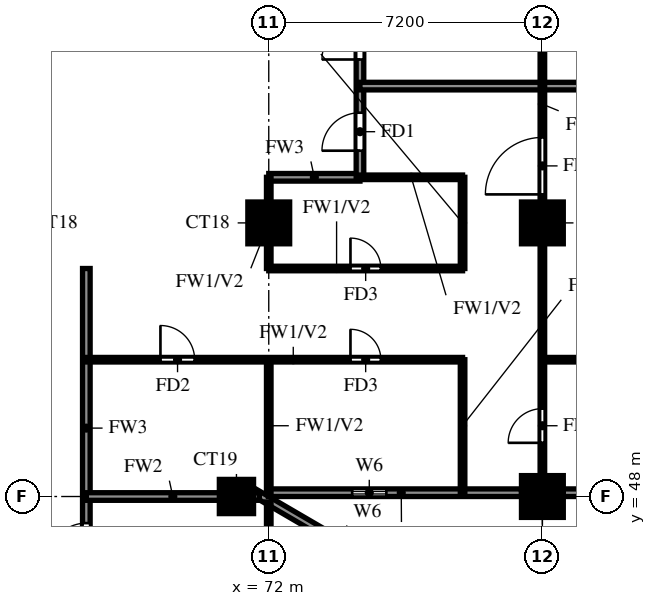
"""IFC4 building model, lengths in metres.
Left out: names, types, materials, properties, quantities, classifications, styles, units other than length and angle.
Written with IfcOpenShell. Run it as: python <this file> out.ifc"""

import sys

from ifc_helpers import new_model, si_unit, direction, frame, frame_2d, origin, origin_2d, place, context, subcontext, project, spatial, rectangle, extrude, source, transform, mapped, element, fill, save


model = new_model("IFC4")
c1 = context("Model", 3, precision=1e-05, world=origin(), true_north=direction((0.0, 1.0)))
c2 = subcontext(c1, "Body", "Model", "MODEL_VIEW")
j1 = project(units=[si_unit("LENGTHUNIT", "METRE"), si_unit("PLANEANGLEUNIT", "RADIAN")], contexts=[c1])
p1 = place(None, origin())
s1 = spatial("IfcSite", under=j1, at=p1, CompositionType="ELEMENT")
p2 = place(p1, origin())
s2 = spatial("IfcBuilding", under=s1, at=p2, CompositionType="ELEMENT")
p3 = place(p2, frame((0.0, 0.0, 120.0)))
s3 = spatial("IfcBuildingStorey", under=s2, at=p3, CompositionType="ELEMENT", Elevation=120.0)
m1 = source(origin(), c2, "Body", "SweptSolid", [
    extrude(rectangle(XDim=0.9, YDim=0.9, at=origin_2d()), origin(), (0.0, 0.0, 1.0), 3.2),
])
p4 = place(p3, frame((71.15, 48.0, 0.0), z_axis=(0.0, 0.0, 1.0), x_axis=(1.0, 0.0, 0.0)))
e1 = element("IfcColumn", 1, at=p4, inside=s3, PredefinedType="COLUMN", context=c2, shape_type="MappedRepresentation", body=[
    mapped(m1, transform((0.0, 0.0, 0.0))),
])
m2 = source(origin(), c2, "Body", "SweptSolid", [
    extrude(rectangle(XDim=1.1, YDim=1.1, at=origin_2d()), origin(), (0.0, 0.0, 1.0), 3.2),
])
for number, where, z_axis, x_axis in (
    (2, (79.2, 48.0, 0.0), (0.0, 0.0, 1.0), (1.0, 0.0, 0.0)),
    (3, (72.0, 55.2, 0.0), (0.0, 0.0, 1.0), (1.0, 0.0, 0.0)),
    (4, (79.2, 55.2, 0.0), (0.0, 0.0, 1.0), (1.0, 0.0, 0.0)),
):
    element("IfcColumn", number, at=place(p3, frame(where, z_axis=z_axis, x_axis=x_axis)), inside=s3, PredefinedType="COLUMN", context=c2, shape_type="MappedRepresentation", body=[
        mapped(m2, transform((0.0, 0.0, 0.0))),
    ])
p5 = place(p3, frame((85.719, 39.881, 0.0), z_axis=(0.0, 0.0, 1.0), x_axis=(-0.86377618652, 0.503875678716, 0.0)))
e5 = element("IfcWall", 5, at=p5, inside=s3, PredefinedType="SOLIDWALL", context=c2, shape_type="SweptSolid", body=[
    extrude(rectangle(XDim=16.311, YDim=0.2, at=frame_2d((8.156, 0.0))), origin(), (0.0, 0.0, 1.0), 3.2),
])
p6 = place(p5, frame((13.326, 0.0, 1.5)))
e6 = element("IfcOpeningElement", 6, at=p6, cuts=e5, PredefinedType="OPENING", context=c2, shape_type="SweptSolid", body=[
    extrude(rectangle(XDim=0.9, YDim=0.9, at=frame_2d((0.45, 0.45))), frame((0.0, 0.11, 0.0), z_axis=(0.0, -1.0, 0.0), x_axis=(1.0, 0.0, 0.0)), (0.0, 0.0, 1.0), 0.22),
])
p7 = place(p3, frame((71.99, 48.1, 0.0), z_axis=(0.0, 0.0, 1.0), x_axis=(1.0, 0.0, 0.0)))
e7 = element("IfcWall", 7, at=p7, inside=s3, PredefinedType="SOLIDWALL", context=c2, shape_type="SweptSolid", body=[
    extrude(rectangle(XDim=6.66, YDim=0.2, at=frame_2d((3.33, 0.0))), origin(), (0.0, 0.0, 1.0), 3.2),
])
p8 = place(p7, frame((2.205, 0.0, 1.5)))
e8 = element("IfcOpeningElement", 8, at=p8, cuts=e7, PredefinedType="OPENING", context=c2, shape_type="SweptSolid", body=[
    extrude(rectangle(XDim=0.9, YDim=0.9, at=frame_2d((0.45, 0.45))), frame((0.0, 0.11, 0.0), z_axis=(0.0, -1.0, 0.0), x_axis=(1.0, 0.0, 0.0)), (0.0, 0.0, 1.0), 0.22),
])
p9 = place(p3, frame((79.75, 48.1, 0.0), z_axis=(0.0, 0.0, 1.0), x_axis=(1.0, 0.0, 0.0)))
e9 = element("IfcWall", 9, at=p9, inside=s3, PredefinedType="SOLIDWALL", context=c2, shape_type="SweptSolid", body=[
    extrude(rectangle(XDim=5.6, YDim=0.2, at=frame_2d((2.8, 0.0))), origin(), (0.0, 0.0, 1.0), 3.2),
])
p10 = place(p9, frame((1.6, 0.0, 0.6)))
e10 = element("IfcOpeningElement", 10, at=p10, cuts=e9, PredefinedType="OPENING", context=c2, shape_type="SweptSolid", body=[
    extrude(rectangle(XDim=2.4, YDim=2.4, at=frame_2d((1.2, 1.2))), frame((0.0, 0.11, 0.0), z_axis=(0.0, -1.0, 0.0), x_axis=(1.0, 0.0, 0.0)), (0.0, 0.0, 1.0), 0.22),
])
p11 = place(p3, frame((72.0, 56.4, 0.0), z_axis=(0.0, 0.0, 1.0), x_axis=(1.0, 0.0, 0.0)))
e11 = element("IfcWall", 11, at=p11, inside=s3, PredefinedType="SOLIDWALL", context=c2, shape_type="SweptSolid", body=[
    extrude(rectangle(XDim=2.4, YDim=0.2, at=frame_2d((1.2, 0.0))), origin(), (0.0, 0.0, 1.0), 3.2),
])
p12 = place(p3, frame((67.2, 45.6, 0.0), z_axis=(0.0, 0.0, 1.0), x_axis=(0.0, 1.0, 0.0)))
e12 = element("IfcWall", 12, at=p12, inside=s3, PredefinedType="SOLIDWALL", context=c2, shape_type="SweptSolid", body=[
    extrude(rectangle(XDim=8.4, YDim=0.2, at=frame_2d((4.2, 0.0))), origin(), (0.0, 0.0, 1.0), 3.2),
])
p13 = place(p12, frame((0.7, 0.0, 0.0)))
e13 = element("IfcOpeningElement", 13, at=p13, cuts=e12, PredefinedType="OPENING", context=c2, shape_type="SweptSolid", body=[
    extrude(rectangle(XDim=1.0, YDim=2.1, at=frame_2d((0.5, 1.05))), frame((0.0, 0.11, 0.0), z_axis=(0.0, -1.0, 0.0), x_axis=(1.0, 0.0, 0.0)), (0.0, 0.0, 1.0), 0.22),
])
p14 = place(p3, frame((74.4, 56.4, 0.0), z_axis=(0.0, 0.0, 1.0), x_axis=(0.0, 1.0, 0.0)))
e14 = element("IfcWall", 14, at=p14, inside=s3, PredefinedType="SOLIDWALL", context=c2, shape_type="SweptSolid", body=[
    extrude(rectangle(XDim=9.6, YDim=0.2, at=frame_2d((4.8, 0.0))), origin(), (0.0, 0.0, 1.0), 3.2),
])
p15 = place(p14, frame((0.7, 0.0, 0.0)))
e15 = element("IfcOpeningElement", 15, at=p15, cuts=e14, PredefinedType="OPENING", context=c2, shape_type="SweptSolid", body=[
    extrude(rectangle(XDim=1.0, YDim=2.1, at=frame_2d((0.5, 1.05))), frame((0.0, 0.11, 0.0), z_axis=(0.0, -1.0, 0.0), x_axis=(1.0, 0.0, 0.0)), (0.0, 0.0, 1.0), 0.22),
])
p16 = place(p14, frame((3.1, 0.0, 0.0)))
e16 = element("IfcOpeningElement", 16, at=p16, cuts=e14, PredefinedType="OPENING", context=c2, shape_type="SweptSolid", body=[
    extrude(rectangle(XDim=1.0, YDim=2.1, at=frame_2d((0.5, 1.05))), frame((0.0, 0.11, 0.0), z_axis=(0.0, -1.0, 0.0), x_axis=(1.0, 0.0, 0.0)), (0.0, 0.0, 1.0), 0.22),
])
p17 = place(p3, frame((67.2, 48.0, 0.0), z_axis=(0.0, 0.0, 1.0), x_axis=(1.0, 0.0, 0.0)))
e17 = element("IfcWall", 17, at=p17, inside=s3, PredefinedType="SOLIDWALL", context=c2, shape_type="SweptSolid", body=[
    extrude(rectangle(XDim=4.552, YDim=0.2, at=frame_2d((2.276, 0.0))), origin(), (0.0, 0.0, 1.0), 3.2),
])
p18 = place(p3, frame((74.4, 58.8, 0.0), z_axis=(0.0, 0.0, 1.0), x_axis=(1.0, 0.0, 0.0)))
e18 = element("IfcWall", 18, at=p18, inside=s3, PredefinedType="SOLIDWALL", context=c2, shape_type="SweptSolid", body=[
    extrude(rectangle(XDim=11.875, YDim=0.2, at=frame_2d((5.938, 0.0))), origin(), (0.0, 0.0, 1.0), 2.3),
])
p19 = place(p3, frame((67.2, 51.6, 0.0), z_axis=(0.0, 0.0, 1.0), x_axis=(1.0, 0.0, 0.0)))
e19 = element("IfcWall", 19, at=p19, inside=s3, PredefinedType="PARTITIONING", context=c2, shape_type="SweptSolid", body=[
    extrude(rectangle(XDim=9.9, YDim=0.12, at=frame_2d((4.95, 0.0))), origin(), (0.0, 0.0, 1.0), 3.2),
])
p20 = place(p19, frame((6.95, 0.0, 0.0)))
e20 = element("IfcOpeningElement", 20, at=p20, cuts=e19, PredefinedType="OPENING", context=c2, shape_type="SweptSolid", body=[
    extrude(rectangle(XDim=0.8, YDim=2.1, at=frame_2d((0.4, 1.05))), frame((0.0, 0.07, 0.0), z_axis=(0.0, -1.0, 0.0), x_axis=(1.0, 0.0, 0.0)), (0.0, 0.0, 1.0), 0.14),
])
p21 = place(p19, frame((1.95, 0.0, 0.0)))
e21 = element("IfcOpeningElement", 21, at=p21, cuts=e19, PredefinedType="OPENING", context=c2, shape_type="SweptSolid", body=[
    extrude(rectangle(XDim=0.9, YDim=2.1, at=frame_2d((0.45, 1.05))), frame((0.0, 0.07, 0.0), z_axis=(0.0, -1.0, 0.0), x_axis=(1.0, 0.0, 0.0)), (0.0, 0.0, 1.0), 0.14),
])
p22 = place(p3, frame((79.2, 51.6, 0.0), z_axis=(0.0, 0.0, 1.0), x_axis=(1.0, 0.0, 0.0)))
e22 = element("IfcWall", 22, at=p22, inside=s3, PredefinedType="PARTITIONING", context=c2, shape_type="SweptSolid", body=[
    extrude(rectangle(XDim=7.075, YDim=0.12, at=frame_2d((3.538, 0.0))), origin(), (0.0, 0.0, 1.0), 2.3),
])
p23 = place(p3, frame((72.0, 54.0, 0.0), z_axis=(0.0, 0.0, 1.0), x_axis=(1.0, 0.0, 0.0)))
e23 = element("IfcWall", 23, at=p23, inside=s3, PredefinedType="PARTITIONING", context=c2, shape_type="SweptSolid", body=[
    extrude(rectangle(XDim=5.1, YDim=0.12, at=frame_2d((2.55, 0.0))), origin(), (0.0, 0.0, 1.0), 3.2),
])
p24 = place(p23, frame((2.15, 0.0, 0.0)))
e24 = element("IfcOpeningElement", 24, at=p24, cuts=e23, PredefinedType="OPENING", context=c2, shape_type="SweptSolid", body=[
    extrude(rectangle(XDim=0.8, YDim=2.1, at=frame_2d((0.4, 1.05))), frame((0.0, 0.07, 0.0), z_axis=(0.0, -1.0, 0.0), x_axis=(1.0, 0.0, 0.0)), (0.0, 0.0, 1.0), 0.14),
])
p25 = place(p3, frame((74.4, 56.4, 0.0), z_axis=(0.0, 0.0, 1.0), x_axis=(1.0, 0.0, 0.0)))
e25 = element("IfcWall", 25, at=p25, inside=s3, PredefinedType="PARTITIONING", context=c2, shape_type="SweptSolid", body=[
    extrude(rectangle(XDim=2.7, YDim=0.12, at=frame_2d((1.35, 0.0))), origin(), (0.0, 0.0, 1.0), 3.2),
])
p26 = place(p3, frame((72.0, 39.725, 0.0), z_axis=(0.0, 0.0, 1.0), x_axis=(0.0, 1.0, 0.0)))
e26 = element("IfcWall", 26, at=p26, inside=s3, PredefinedType="PARTITIONING", context=c2, shape_type="SweptSolid", body=[
    extrude(rectangle(XDim=8.13, YDim=0.12, at=frame_2d((4.065, 0.0))), origin(), (0.0, 0.0, 1.0), 2.3),
])
p27 = place(p26, frame((1.788, 0.0, 0.0)))
e27 = element("IfcOpeningElement", 27, at=p27, cuts=e26, PredefinedType="OPENING", context=c2, shape_type="SweptSolid", body=[
    extrude(rectangle(XDim=0.9, YDim=2.1, at=frame_2d((0.45, 1.05))), frame((0.0, 0.07, 0.0), z_axis=(0.0, -1.0, 0.0), x_axis=(1.0, 0.0, 0.0)), (0.0, 0.0, 1.0), 0.14),
])
p28 = place(p26, frame((4.575, 0.0, 0.0)))
e28 = element("IfcOpeningElement", 28, at=p28, cuts=e26, PredefinedType="OPENING", context=c2, shape_type="SweptSolid", body=[
    extrude(rectangle(XDim=0.8, YDim=2.1, at=frame_2d((0.4, 1.05))), frame((0.0, 0.07, 0.0), z_axis=(0.0, -1.0, 0.0), x_axis=(1.0, 0.0, 0.0)), (0.0, 0.0, 1.0), 0.14),
])
p29 = place(p3, frame((72.0, 48.125, 0.0), z_axis=(0.0, 0.0, 1.0), x_axis=(0.0, 1.0, 0.0)))
e29 = element("IfcWall", 29, at=p29, inside=s3, PredefinedType="PARTITIONING", context=c2, shape_type="SweptSolid", body=[
    extrude(rectangle(XDim=3.475, YDim=0.12, at=frame_2d((1.738, 0.0))), origin(), (0.0, 0.0, 1.0), 3.2),
])
p30 = place(p3, frame((72.0, 54.0, 0.0), z_axis=(0.0, 0.0, 1.0), x_axis=(0.0, 1.0, 0.0)))
e30 = element("IfcWall", 30, at=p30, inside=s3, PredefinedType="PARTITIONING", context=c2, shape_type="SweptSolid", body=[
    extrude(rectangle(XDim=2.4, YDim=0.12, at=frame_2d((1.2, 0.0))), origin(), (0.0, 0.0, 1.0), 3.2),
])
p31 = place(p3, frame((77.1, 48.125, 0.0), z_axis=(0.0, 0.0, 1.0), x_axis=(0.0, 1.0, 0.0)))
e31 = element("IfcWall", 31, at=p31, inside=s3, PredefinedType="PARTITIONING", context=c2, shape_type="SweptSolid", body=[
    extrude(rectangle(XDim=3.475, YDim=0.12, at=frame_2d((1.738, 0.0))), origin(), (0.0, 0.0, 1.0), 3.2),
])
p32 = place(p3, frame((77.1, 54.0, 0.0), z_axis=(0.0, 0.0, 1.0), x_axis=(0.0, 1.0, 0.0)))
e32 = element("IfcWall", 32, at=p32, inside=s3, PredefinedType="PARTITIONING", context=c2, shape_type="SweptSolid", body=[
    extrude(rectangle(XDim=2.4, YDim=0.12, at=frame_2d((1.2, 0.0))), origin(), (0.0, 0.0, 1.0), 3.2),
])
p33 = place(p3, frame((79.2, 48.125, 0.0), z_axis=(0.0, 0.0, 1.0), x_axis=(0.0, 1.0, 0.0)))
e33 = element("IfcWall", 33, at=p33, inside=s3, PredefinedType="PARTITIONING", context=c2, shape_type="SweptSolid", body=[
    extrude(rectangle(XDim=21.475, YDim=0.12, at=frame_2d((10.738, 0.0))), origin(), (0.0, 0.0, 1.0), 3.2),
])
p34 = place(p33, frame((1.288, 0.0, 0.0)))
e34 = element("IfcOpeningElement", 34, at=p34, cuts=e33, PredefinedType="OPENING", context=c2, shape_type="SweptSolid", body=[
    extrude(rectangle(XDim=0.9, YDim=2.1, at=frame_2d((0.45, 1.05))), frame((0.0, 0.07, 0.0), z_axis=(0.0, -1.0, 0.0), x_axis=(1.0, 0.0, 0.0)), (0.0, 0.0, 1.0), 0.14),
])
p35 = place(p33, frame((7.825, 0.0, 0.0)))
e35 = element("IfcOpeningElement", 35, at=p35, cuts=e33, PredefinedType="OPENING", context=c2, shape_type="SweptSolid", body=[
    extrude(rectangle(XDim=1.5, YDim=2.1, at=frame_2d((0.75, 1.05))), frame((0.0, 0.07, 0.0), z_axis=(0.0, -1.0, 0.0), x_axis=(1.0, 0.0, 0.0)), (0.0, 0.0, 1.0), 0.14),
])
p36 = place(p33, frame((12.025, 0.0, 0.0)))
e36 = element("IfcOpeningElement", 36, at=p36, cuts=e33, PredefinedType="OPENING", context=c2, shape_type="SweptSolid", body=[
    extrude(rectangle(XDim=0.9, YDim=2.1, at=frame_2d((0.45, 1.05))), frame((0.0, 0.07, 0.0), z_axis=(0.0, -1.0, 0.0), x_axis=(1.0, 0.0, 0.0)), (0.0, 0.0, 1.0), 0.14),
])
p37 = place(p33, frame((17.425, 0.0, 0.0)))
e37 = element("IfcOpeningElement", 37, at=p37, cuts=e33, PredefinedType="OPENING", context=c2, shape_type="SweptSolid", body=[
    extrude(rectangle(XDim=0.9, YDim=2.1, at=frame_2d((0.45, 1.05))), frame((0.0, 0.07, 0.0), z_axis=(0.0, -1.0, 0.0), x_axis=(1.0, 0.0, 0.0)), (0.0, 0.0, 1.0), 0.14),
])
p38 = place(p8, origin())
e38 = element("IfcWindow", 38, at=p38, inside=s3, PartitioningType="SINGLE_PANEL", PredefinedType="WINDOW", context=c2, shape_type="SweptSolid", body=[
    extrude(rectangle(XDim=0.9, YDim=0.9, at=frame_2d((0.45, 0.45))), frame((0.0, 0.03, 0.0), z_axis=(0.0, -1.0, 0.0), x_axis=(1.0, 0.0, 0.0)), (0.0, 0.0, 1.0), 0.06),
])
fill(e8, e38)
p39 = place(p15, origin())
e39 = element("IfcDoor", 39, at=p39, inside=s3, OperationType="SINGLE_SWING_LEFT", PredefinedType="DOOR", context=c2, shape_type="SweptSolid", body=[
    extrude(rectangle(XDim=1.0, YDim=2.1, at=frame_2d((0.5, 1.05))), frame((0.0, 0.025, 0.0), z_axis=(0.0, -1.0, 0.0), x_axis=(1.0, 0.0, 0.0)), (0.0, 0.0, 1.0), 0.05),
])
fill(e15, e39)
p40 = place(p34, origin())
e40 = element("IfcDoor", 40, at=p40, inside=s3, OperationType="SINGLE_SWING_LEFT", PredefinedType="DOOR", context=c2, shape_type="SweptSolid", body=[
    extrude(rectangle(XDim=0.9, YDim=2.1, at=frame_2d((0.45, 1.05))), frame((0.0, 0.025, 0.0), z_axis=(0.0, -1.0, 0.0), x_axis=(1.0, 0.0, 0.0)), (0.0, 0.0, 1.0), 0.05),
])
fill(e34, e40)
p41 = place(p35, origin())
e41 = element("IfcDoor", 41, at=p41, inside=s3, OperationType="SINGLE_SWING_LEFT", PredefinedType="DOOR", context=c2, shape_type="SweptSolid", body=[
    extrude(rectangle(XDim=1.5, YDim=2.1, at=frame_2d((0.75, 1.05))), frame((0.0, 0.025, 0.0), z_axis=(0.0, -1.0, 0.0), x_axis=(1.0, 0.0, 0.0)), (0.0, 0.0, 1.0), 0.05),
])
fill(e35, e41)
p42 = place(p20, origin())
e42 = element("IfcDoor", 42, at=p42, inside=s3, OperationType="SINGLE_SWING_LEFT", PredefinedType="DOOR", context=c2, shape_type="SweptSolid", body=[
    extrude(rectangle(XDim=0.8, YDim=2.1, at=frame_2d((0.4, 1.05))), frame((0.0, 0.025, 0.0), z_axis=(0.0, -1.0, 0.0), x_axis=(1.0, 0.0, 0.0)), (0.0, 0.0, 1.0), 0.05),
])
fill(e20, e42)
p43 = place(p24, origin())
e43 = element("IfcDoor", 43, at=p43, inside=s3, OperationType="SINGLE_SWING_LEFT", PredefinedType="DOOR", context=c2, shape_type="SweptSolid", body=[
    extrude(rectangle(XDim=0.8, YDim=2.1, at=frame_2d((0.4, 1.05))), frame((0.0, 0.025, 0.0), z_axis=(0.0, -1.0, 0.0), x_axis=(1.0, 0.0, 0.0)), (0.0, 0.0, 1.0), 0.05),
])
fill(e24, e43)
p44 = place(p21, origin())
e44 = element("IfcDoor", 44, at=p44, inside=s3, OperationType="SINGLE_SWING_RIGHT", PredefinedType="DOOR", context=c2, shape_type="SweptSolid", body=[
    extrude(rectangle(XDim=0.9, YDim=2.1, at=frame_2d((0.45, 1.05))), frame((0.0, 0.025, 0.0), z_axis=(0.0, -1.0, 0.0), x_axis=(1.0, 0.0, 0.0)), (0.0, 0.0, 1.0), 0.05),
])
fill(e21, e44)
p45 = place(p16, origin())
e45 = element("IfcDoor", 45, at=p45, inside=s3, OperationType="SINGLE_SWING_LEFT", PredefinedType="DOOR", context=c2, shape_type="SweptSolid", body=[
    extrude(rectangle(XDim=1.0, YDim=2.1, at=frame_2d((0.5, 1.05))), frame((0.0, 0.025, 0.0), z_axis=(0.0, -1.0, 0.0), x_axis=(1.0, 0.0, 0.0)), (0.0, 0.0, 1.0), 0.05),
])
fill(e16, e45)
p46 = place(p13, origin())
e46 = element("IfcDoor", 46, at=p46, inside=s3, OperationType="SINGLE_SWING_LEFT", PredefinedType="DOOR", context=c2, shape_type="SweptSolid", body=[
    extrude(rectangle(XDim=1.0, YDim=2.1, at=frame_2d((0.5, 1.05))), frame((0.0, 0.025, 0.0), z_axis=(0.0, -1.0, 0.0), x_axis=(1.0, 0.0, 0.0)), (0.0, 0.0, 1.0), 0.05),
])
fill(e13, e46)
save(model, sys.argv[1])
